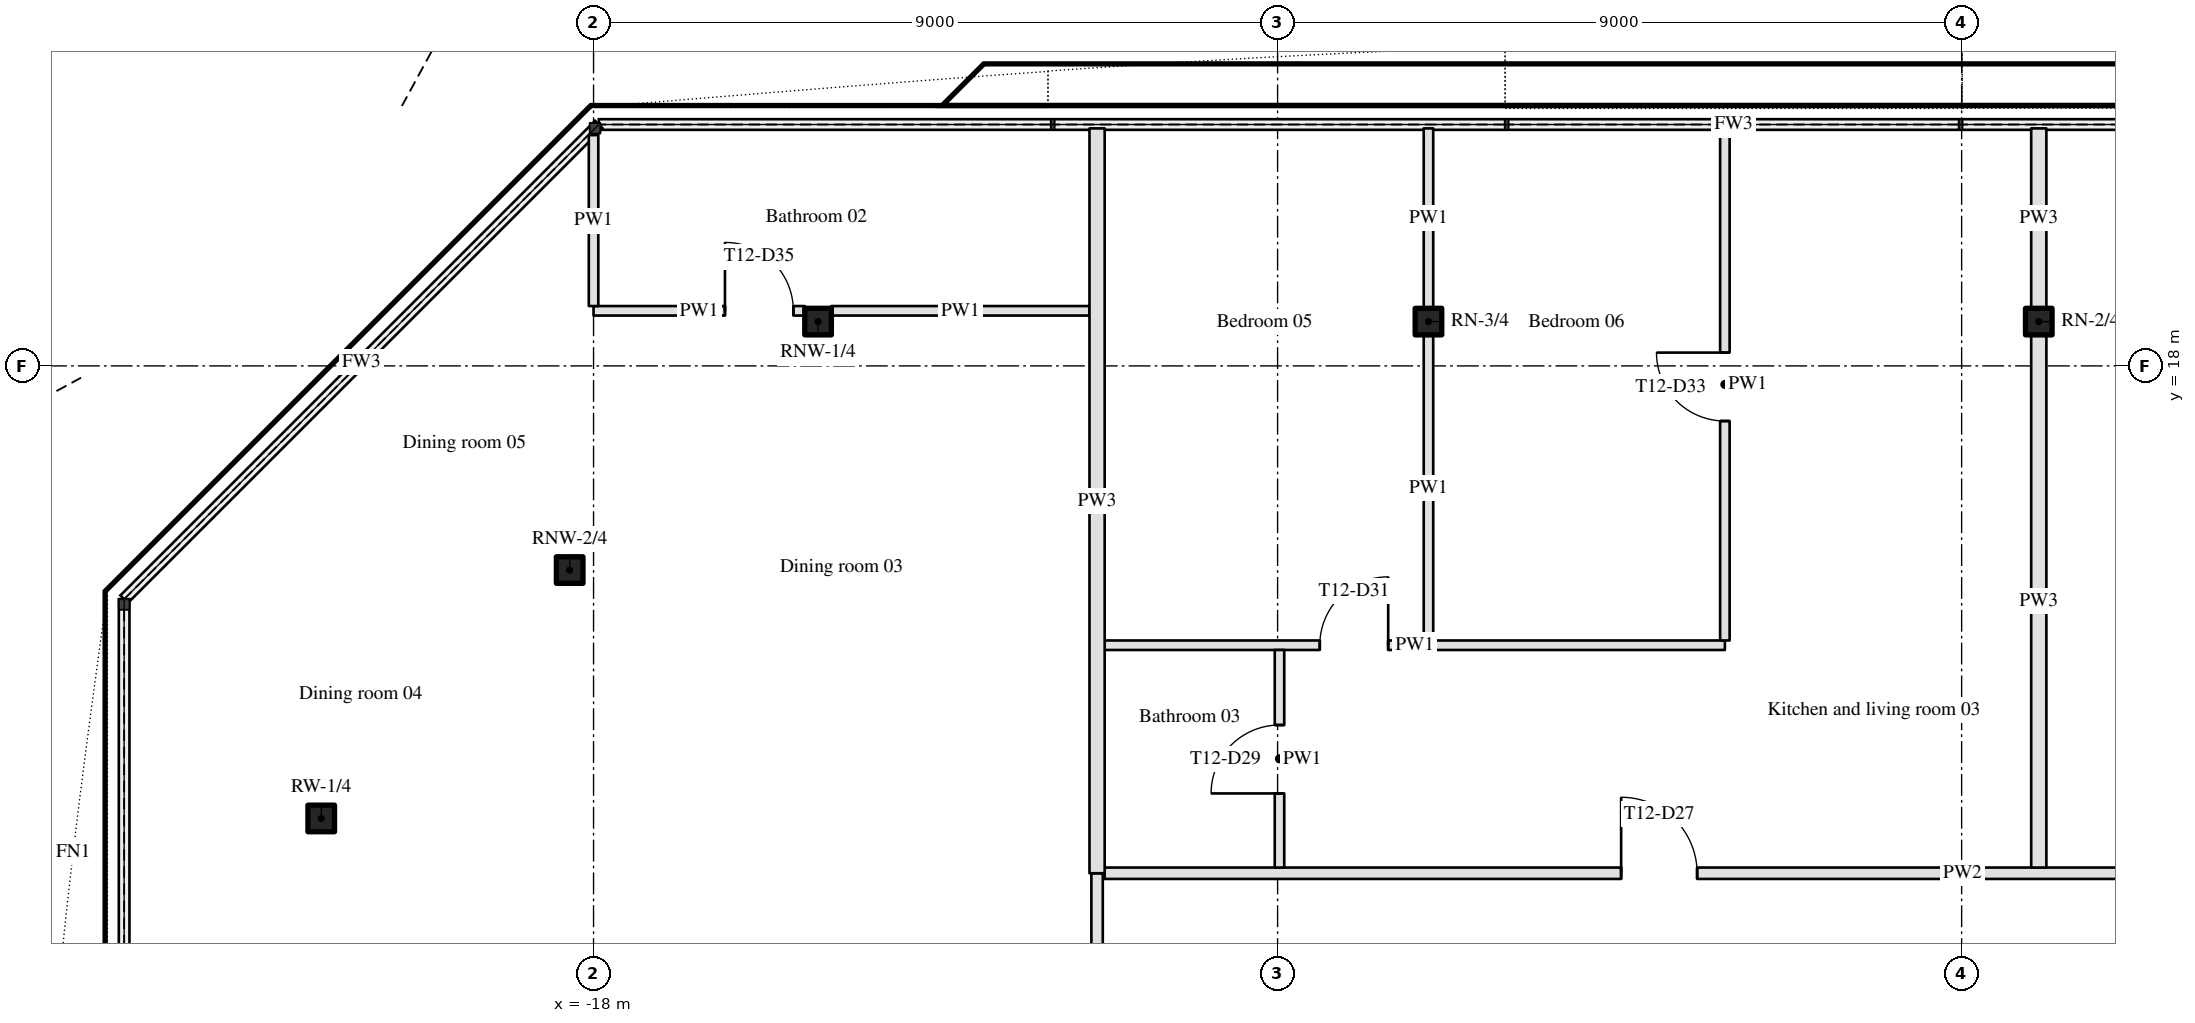
"""IFC4 building model, lengths in metres.
Left out: names, types, materials, properties, quantities, classifications, styles, units other than length and angle.
Written with IfcOpenShell. Run it as: python <this file> out.ifc"""

import sys

from ifc_helpers import new_model, si_unit, direction, frame, frame_2d, origin, origin_2d, place, context, subcontext, project, spatial, rectangle, hollow_rectangle, extrude, element, fill, save


model = new_model("IFC4")
c1 = context("Model", 3, precision=1e-05, world=origin(), true_north=direction((0.0, 1.0)))
c2 = subcontext(c1, "Body", "Model", "MODEL_VIEW")
j1 = project(units=[si_unit("LENGTHUNIT", "METRE"), si_unit("PLANEANGLEUNIT", "RADIAN")], contexts=[c1])
p1 = place(None, origin())
s1 = spatial("IfcSite", under=j1, at=p1, CompositionType="ELEMENT")
p2 = place(p1, origin())
s2 = spatial("IfcBuilding", under=s1, at=p2, CompositionType="ELEMENT")
p3 = place(p2, frame((0.0, 0.0, 172.2)))
s3 = spatial("IfcBuildingStorey", under=s2, at=p3, CompositionType="ELEMENT", Elevation=172.2)
for number, where, z_axis, x_axis in (
    (1, (1.015, 18.583, 0.0), (0.0, 0.0, 1.0), (1.0, 0.0, 0.0)),
    (2, (-7.015, 18.583, 0.0), (0.0, 0.0, 1.0), (1.0, 0.0, 0.0)),
    (3, (-15.046, 18.583, 0.0), (0.0, 0.0, 1.0), (1.0, 0.0, 0.0)),
    (4, (-18.314, 15.314, 0.0), (0.0, 0.0, 1.0), (1.0, 0.0, 0.0)),
    (5, (-21.583, 12.046, 0.0), (0.0, 0.0, 1.0), (1.0, 0.0, 0.0)),
):
    element("IfcColumn", number, at=place(p3, frame(where, z_axis=z_axis, x_axis=x_axis)), inside=s3, PredefinedType="COLUMN", context=c2, shape_type="SweptSolid", body=[
        extrude(hollow_rectangle(XDim=0.35, YDim=0.35, WallThickness=0.02, InnerFilletRadius=0.03, OuterFilletRadius=0.05, at=origin_2d()), origin(), (0.0, 0.0, 1.0), 3.15),
    ])
p4 = place(p3, frame((-11.275, 11.325, 0.0), z_axis=(0.0, 0.0, 1.0), x_axis=(1.0, 0.0, 0.0)))
e6 = element("IfcWall", 6, at=p4, inside=s3, PredefinedType="PARTITIONING", context=c2, shape_type="SweptSolid", body=[
    extrude(rectangle(XDim=22.575, YDim=0.15, at=frame_2d((11.288, 0.0))), origin(), (0.0, 0.0, 1.0), 2.21),
])
p5 = place(p4, frame((6.795, 0.0, 0.0)))
e7 = element("IfcOpeningElement", 7, at=p5, cuts=e6, PredefinedType="OPENING", context=c2, shape_type="SweptSolid", body=[
    extrude(rectangle(XDim=1.0, YDim=2.1, at=frame_2d((0.5, 1.05))), frame((0.0, 0.085, 0.0), z_axis=(0.0, -1.0, 0.0), x_axis=(1.0, 0.0, 0.0)), (0.0, 0.0, 1.0), 0.17),
])
p6 = place(p4, frame((16.032, 0.0, 0.0)))
e8 = element("IfcOpeningElement", 8, at=p6, cuts=e6, PredefinedType="OPENING", context=c2, shape_type="SweptSolid", body=[
    extrude(rectangle(XDim=1.0, YDim=2.1, at=frame_2d((0.5, 1.05))), frame((0.0, 0.085, 0.0), z_axis=(0.0, -1.0, 0.0), x_axis=(1.0, 0.0, 0.0)), (0.0, 0.0, 1.0), 0.17),
])
p7 = place(p3, frame((-11.275, 14.325, 0.0), z_axis=(0.0, 0.0, 1.0), x_axis=(1.0, 0.0, 0.0)))
e9 = element("IfcWall", 9, at=p7, inside=s3, PredefinedType="PARTITIONING", context=c2, shape_type="SweptSolid", body=[
    extrude(rectangle(XDim=8.16, YDim=0.125, at=frame_2d((4.08, 0.0))), origin(), (0.0, 0.0, 1.0), 2.21),
])
p8 = place(p7, frame((2.83, 0.0, 0.0)))
e10 = element("IfcOpeningElement", 10, at=p8, cuts=e9, PredefinedType="OPENING", context=c2, shape_type="SweptSolid", body=[
    extrude(rectangle(XDim=0.9, YDim=2.1, at=frame_2d((0.45, 1.05))), frame((0.0, 0.073, 0.0), z_axis=(0.0, -1.0, 0.0), x_axis=(1.0, 0.0, 0.0)), (0.0, 0.0, 1.0), 0.145),
])
p9 = place(p3, frame((-18.0, 18.725, 0.0), z_axis=(0.0, 0.0, 1.0), x_axis=(1.0, 0.0, 0.0)))
e11 = element("IfcWall", 11, at=p9, inside=s3, PredefinedType="PARTITIONING", context=c2, shape_type="SweptSolid", body=[
    extrude(rectangle(XDim=2.779, YDim=0.125, at=frame_2d((1.39, 0.0))), origin(), (0.0, 0.0, 1.0), 2.21),
])
p10 = place(p9, frame((1.729, 0.0, 0.0)))
e12 = element("IfcOpeningElement", 12, at=p10, cuts=e11, PredefinedType="OPENING", context=c2, shape_type="SweptSolid", body=[
    extrude(rectangle(XDim=0.9, YDim=2.1, at=frame_2d((0.45, 1.05))), frame((0.0, 0.073, 0.0), z_axis=(0.0, -1.0, 0.0), x_axis=(1.0, 0.0, 0.0)), (0.0, 0.0, 1.0), 0.145),
])
p11 = place(p3, frame((-14.871, 18.725, 0.0), z_axis=(0.0, 0.0, 1.0), x_axis=(1.0, 0.0, 0.0)))
e13 = element("IfcWall", 13, at=p11, inside=s3, PredefinedType="PARTITIONING", context=c2, shape_type="SweptSolid", body=[
    extrude(rectangle(XDim=3.396, YDim=0.125, at=frame_2d((1.698, 0.0))), origin(), (0.0, 0.0, 1.0), 2.21),
])
p12 = place(p3, frame((-18.0, 18.788, 0.0), z_axis=(0.0, 0.0, 1.0), x_axis=(0.0, 1.0, 0.0)))
e14 = element("IfcWall", 14, at=p12, inside=s3, PredefinedType="PARTITIONING", context=c2, shape_type="SweptSolid", body=[
    extrude(rectangle(XDim=2.25, YDim=0.125, at=frame_2d((1.125, 0.0))), origin(), (0.0, 0.0, 1.0), 2.21),
])
p13 = place(p3, frame((-11.375, -11.925, 0.0), z_axis=(0.0, 0.0, 1.0), x_axis=(0.0, 1.0, 0.0)))
e15 = element("IfcWall", 15, at=p13, inside=s3, PredefinedType="PARTITIONING", context=c2, shape_type="SweptSolid", body=[
    extrude(rectangle(XDim=23.25, YDim=0.15, at=frame_2d((11.625, 0.0))), origin(), (0.0, 0.0, 1.0), 2.21),
])
p14 = place(p13, frame((1.067, 0.0, 0.0)))
e16 = element("IfcOpeningElement", 16, at=p14, cuts=e15, PredefinedType="OPENING", context=c2, shape_type="SweptSolid", body=[
    extrude(rectangle(XDim=1.0, YDim=2.1, at=frame_2d((0.5, 1.05))), frame((0.0, 0.085, 0.0), z_axis=(0.0, -1.0, 0.0), x_axis=(1.0, 0.0, 0.0)), (0.0, 0.0, 1.0), 0.17),
])
p15 = place(p13, frame((19.01, 0.0, 0.0)))
e17 = element("IfcOpeningElement", 17, at=p15, cuts=e15, PredefinedType="OPENING", context=c2, shape_type="SweptSolid", body=[
    extrude(rectangle(XDim=1.0, YDim=2.1, at=frame_2d((0.5, 1.05))), frame((0.0, 0.085, 0.0), z_axis=(0.0, -1.0, 0.0), x_axis=(1.0, 0.0, 0.0)), (0.0, 0.0, 1.0), 0.17),
])
p16 = place(p3, frame((-11.375, 11.325, 0.0), z_axis=(0.0, 0.0, 1.0), x_axis=(0.0, 1.0, 0.0)))
e18 = element("IfcWall", 18, at=p16, inside=s3, PredefinedType="PARTITIONING", context=c2, shape_type="SweptSolid", body=[
    extrude(rectangle(XDim=9.8, YDim=0.2, at=frame_2d((4.9, 0.0))), origin(), (0.0, 0.0, 1.0), 2.21),
])
p17 = place(p3, frame((-8.975, 11.4, 0.0), z_axis=(0.0, 0.0, 1.0), x_axis=(0.0, 1.0, 0.0)))
e19 = element("IfcWall", 19, at=p17, inside=s3, PredefinedType="PARTITIONING", context=c2, shape_type="SweptSolid", body=[
    extrude(rectangle(XDim=2.863, YDim=0.125, at=frame_2d((1.431, 0.0))), origin(), (0.0, 0.0, 1.0), 2.21),
])
p18 = place(p17, frame((0.975, 0.0, 0.0)))
e20 = element("IfcOpeningElement", 20, at=p18, cuts=e19, PredefinedType="OPENING", context=c2, shape_type="SweptSolid", body=[
    extrude(rectangle(XDim=0.9, YDim=2.1, at=frame_2d((0.45, 1.05))), frame((0.0, 0.073, 0.0), z_axis=(0.0, -1.0, 0.0), x_axis=(1.0, 0.0, 0.0)), (0.0, 0.0, 1.0), 0.145),
])
p19 = place(p3, frame((-7.015, 14.387, 0.0), z_axis=(0.0, 0.0, 1.0), x_axis=(0.0, 1.0, 0.0)))
e21 = element("IfcWall", 21, at=p19, inside=s3, PredefinedType="PARTITIONING", context=c2, shape_type="SweptSolid", body=[
    extrude(rectangle(XDim=4.021, YDim=0.125, at=frame_2d((2.01, 0.0))), origin(), (0.0, 0.0, 1.0), 2.21),
])
p20 = place(p3, frame((-7.015, 18.758, 0.0), z_axis=(0.0, 0.0, 1.0), x_axis=(0.0, 1.0, 0.0)))
e22 = element("IfcWall", 22, at=p20, inside=s3, PredefinedType="PARTITIONING", context=c2, shape_type="SweptSolid", body=[
    extrude(rectangle(XDim=2.367, YDim=0.125, at=frame_2d((1.184, 0.0))), origin(), (0.0, 0.0, 1.0), 2.21),
])
p21 = place(p3, frame((-3.115, 14.387, 0.0), z_axis=(0.0, 0.0, 1.0), x_axis=(0.0, 1.0, 0.0)))
e23 = element("IfcWall", 23, at=p21, inside=s3, PredefinedType="PARTITIONING", context=c2, shape_type="SweptSolid", body=[
    extrude(rectangle(XDim=6.738, YDim=0.125, at=frame_2d((3.369, 0.0))), origin(), (0.0, 0.0, 1.0), 2.21),
])
p22 = place(p21, frame((2.887, 0.0, 0.0)))
e24 = element("IfcOpeningElement", 24, at=p22, cuts=e23, PredefinedType="OPENING", context=c2, shape_type="SweptSolid", body=[
    extrude(rectangle(XDim=0.9, YDim=2.1, at=frame_2d((0.45, 1.05))), frame((0.0, 0.073, 0.0), z_axis=(0.0, -1.0, 0.0), x_axis=(1.0, 0.0, 0.0)), (0.0, 0.0, 1.0), 0.145),
])
p23 = place(p3, frame((1.015, 11.4, 0.0), z_axis=(0.0, 0.0, 1.0), x_axis=(0.0, 1.0, 0.0)))
e25 = element("IfcWall", 25, at=p23, inside=s3, PredefinedType="PARTITIONING", context=c2, shape_type="SweptSolid", body=[
    extrude(rectangle(XDim=7.008, YDim=0.2, at=frame_2d((3.504, 0.0))), origin(), (0.0, 0.0, 1.0), 2.21),
])
p24 = place(p3, frame((1.015, 18.758, 0.0), z_axis=(0.0, 0.0, 1.0), x_axis=(0.0, 1.0, 0.0)))
e26 = element("IfcWall", 26, at=p24, inside=s3, PredefinedType="PARTITIONING", context=c2, shape_type="SweptSolid", body=[
    extrude(rectangle(XDim=2.367, YDim=0.2, at=frame_2d((1.184, 0.0))), origin(), (0.0, 0.0, 1.0), 2.21),
])
p25 = place(p5, origin())
e27 = element("IfcDoor", 27, at=p25, inside=s3, OperationType="SINGLE_SWING_LEFT", PredefinedType="DOOR", context=c2, shape_type="SweptSolid", body=[
    extrude(rectangle(XDim=1.0, YDim=2.1, at=frame_2d((0.5, 1.05))), frame((0.0, 0.025, 0.0), z_axis=(0.0, -1.0, 0.0), x_axis=(1.0, 0.0, 0.0)), (0.0, 0.0, 1.0), 0.05),
])
fill(e7, e27)
p26 = place(p10, origin())
e28 = element("IfcDoor", 28, at=p26, inside=s3, OperationType="SINGLE_SWING_LEFT", PredefinedType="DOOR", context=c2, shape_type="SweptSolid", body=[
    extrude(rectangle(XDim=0.9, YDim=2.1, at=frame_2d((0.45, 1.05))), frame((0.0, 0.025, 0.0), z_axis=(0.0, -1.0, 0.0), x_axis=(1.0, 0.0, 0.0)), (0.0, 0.0, 1.0), 0.05),
])
fill(e12, e28)
p27 = place(p18, origin())
e29 = element("IfcDoor", 29, at=p27, inside=s3, OperationType="SINGLE_SWING_LEFT", PredefinedType="DOOR", context=c2, shape_type="SweptSolid", body=[
    extrude(rectangle(XDim=0.9, YDim=2.1, at=frame_2d((0.45, 1.05))), frame((0.0, 0.025, 0.0), z_axis=(0.0, -1.0, 0.0), x_axis=(1.0, 0.0, 0.0)), (0.0, 0.0, 1.0), 0.05),
])
fill(e20, e29)
p28 = place(p8, origin())
e30 = element("IfcDoor", 30, at=p28, inside=s3, OperationType="SINGLE_SWING_RIGHT", PredefinedType="DOOR", context=c2, shape_type="SweptSolid", body=[
    extrude(rectangle(XDim=0.9, YDim=2.1, at=frame_2d((0.45, 1.05))), frame((0.0, 0.025, 0.0), z_axis=(0.0, -1.0, 0.0), x_axis=(1.0, 0.0, 0.0)), (0.0, 0.0, 1.0), 0.05),
])
fill(e10, e30)
p29 = place(p22, origin())
e31 = element("IfcDoor", 31, at=p29, inside=s3, OperationType="SINGLE_SWING_RIGHT", PredefinedType="DOOR", context=c2, shape_type="SweptSolid", body=[
    extrude(rectangle(XDim=0.9, YDim=2.1, at=frame_2d((0.45, 1.05))), frame((0.0, 0.025, 0.0), z_axis=(0.0, -1.0, 0.0), x_axis=(1.0, 0.0, 0.0)), (0.0, 0.0, 1.0), 0.05),
])
fill(e24, e31)
save(model, sys.argv[1])
